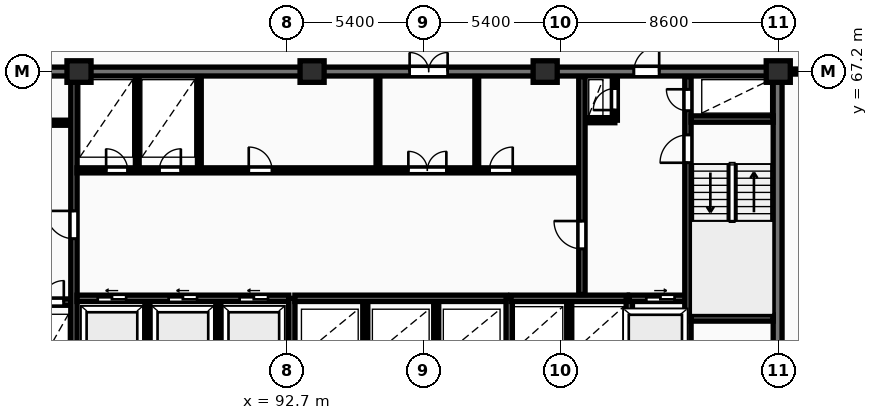
"""IFC4 building model, lengths in metres.
Left out: names, types, materials, properties, quantities, classifications, styles, units other than length and angle.
Written with IfcOpenShell. Run it as: python <this file> out.ifc"""

import sys

from ifc_helpers import new_model, si_unit, direction, frame, frame_2d, origin, origin_2d, place, context, subcontext, project, spatial, rectangle, extrude, element, fill, save


model = new_model("IFC4")
c1 = context("Model", 3, precision=1e-05, world=origin(), true_north=direction((0.0, 1.0)))
c2 = subcontext(c1, "Body", "Model", "MODEL_VIEW")
j1 = project(units=[si_unit("LENGTHUNIT", "METRE"), si_unit("PLANEANGLEUNIT", "RADIAN")], contexts=[c1])
p1 = place(None, origin())
s1 = spatial("IfcSite", under=j1, at=p1, CompositionType="ELEMENT")
p2 = place(p1, origin())
s2 = spatial("IfcBuilding", under=s1, at=p2, CompositionType="ELEMENT")
p3 = place(p2, frame((0.0, 0.0, 87.3)))
s3 = spatial("IfcBuildingStorey", under=s2, at=p3, CompositionType="ELEMENT", Elevation=87.3)
for number, where, z_axis, x_axis in (
    (1, (84.5, 67.2, 0.0), (0.0, 0.0, 1.0), (1.0, 0.0, 0.0)),
    (2, (93.7, 67.2, 0.0), (0.0, 0.0, 1.0), (1.0, 0.0, 0.0)),
    (3, (102.9, 67.2, 0.0), (0.0, 0.0, 1.0), (1.0, 0.0, 0.0)),
    (4, (112.1, 67.2, 0.0), (0.0, 0.0, 1.0), (1.0, 0.0, 0.0)),
):
    element("IfcColumn", number, at=place(p3, frame(where, z_axis=z_axis, x_axis=x_axis)), inside=s3, PredefinedType="COLUMN", context=c2, shape_type="SweptSolid", body=[
        extrude(rectangle(XDim=0.95, YDim=0.85, at=origin_2d()), origin(), (0.0, 0.0, 1.0), 3.25),
    ])
p4 = place(p3, frame((112.075, 55.375, 0.0), z_axis=(0.0, 0.0, 1.0), x_axis=(0.0, 1.0, 0.0)))
e5 = element("IfcWall", 5, at=p4, inside=s3, PredefinedType="SHEAR", context=c2, shape_type="SweptSolid", body=[
    extrude(rectangle(XDim=11.65, YDim=0.35, at=frame_2d((5.825, 0.0))), origin(), (0.0, 0.0, 1.0), 3.25),
])
p5 = place(p3, frame((75.95, 67.2, 0.0), z_axis=(0.0, 0.0, 1.0), x_axis=(1.0, 0.0, 0.0)))
e6 = element("IfcWall", 6, at=p5, inside=s3, PredefinedType="SHEAR", context=c2, shape_type="SweptSolid", body=[
    extrude(rectangle(XDim=36.3, YDim=0.35, at=frame_2d((18.15, 0.0))), origin(), (0.0, 0.0, 1.0), 3.25),
])
p6 = place(p5, frame((5.25, 0.0, 0.0)))
e7 = element("IfcOpeningElement", 7, at=p6, cuts=e6, PredefinedType="OPENING", context=c2, shape_type="SweptSolid", body=[
    extrude(rectangle(XDim=1.0, YDim=2.15, at=frame_2d((0.5, 1.075))), frame((0.0, 0.185, 0.0), z_axis=(0.0, -1.0, 0.0), x_axis=(1.0, 0.0, 0.0)), (0.0, 0.0, 1.0), 0.37),
])
p7 = place(p5, frame((21.6, 0.0, 0.0)))
e8 = element("IfcOpeningElement", 8, at=p7, cuts=e6, PredefinedType="OPENING", context=c2, shape_type="SweptSolid", body=[
    extrude(rectangle(XDim=1.5, YDim=2.2, at=frame_2d((0.75, 1.1))), frame((0.0, 0.185, 0.0), z_axis=(0.0, -1.0, 0.0), x_axis=(1.0, 0.0, 0.0)), (0.0, 0.0, 1.0), 0.37),
])
p8 = place(p5, frame((30.45, 0.0, 0.0)))
e9 = element("IfcOpeningElement", 9, at=p8, cuts=e6, PredefinedType="OPENING", context=c2, shape_type="SweptSolid", body=[
    extrude(rectangle(XDim=1.0, YDim=2.15, at=frame_2d((0.5, 1.075))), frame((0.0, 0.185, 0.0), z_axis=(0.0, -1.0, 0.0), x_axis=(1.0, 0.0, 0.0)), (0.0, 0.0, 1.0), 0.37),
])
p9 = place(p3, frame((79.79, 58.1, 0.0), z_axis=(0.0, 0.0, 1.0), x_axis=(1.0, 0.0, 0.0)))
e10 = element("IfcWall", 10, at=p9, inside=s3, PredefinedType="SHEAR", context=c2, shape_type="SweptSolid", body=[
    extrude(rectangle(XDim=4.39, YDim=0.25, at=frame_2d((2.195, 0.0))), origin(), (0.0, 0.0, 1.0), 3.25),
])
p10 = place(p9, frame((1.05, 0.0, 0.0)))
e11 = element("IfcOpeningElement", 11, at=p10, cuts=e10, PredefinedType="OPENING", context=c2, shape_type="SweptSolid", body=[
    extrude(rectangle(XDim=1.12, YDim=2.12, at=frame_2d((0.56, 1.06))), frame((0.0, 0.135, 0.0), z_axis=(0.0, -1.0, 0.0), x_axis=(1.0, 0.0, 0.0)), (0.0, 0.0, 1.0), 0.27),
])
p11 = place(p9, frame((3.26, 0.0, 0.0)))
e12 = element("IfcOpeningElement", 12, at=p11, cuts=e10, PredefinedType="OPENING", context=c2, shape_type="SweptSolid", body=[
    extrude(rectangle(XDim=0.85, YDim=2.05, at=frame_2d((0.425, 1.025))), frame((0.0, 0.135, 0.0), z_axis=(0.0, -1.0, 0.0), x_axis=(1.0, 0.0, 0.0)), (0.0, 0.0, 1.0), 0.27),
])
p12 = place(p3, frame((79.79, 65.18, 0.0), z_axis=(0.0, 0.0, 1.0), x_axis=(1.0, 0.0, 0.0)))
e13 = element("IfcWall", 13, at=p12, inside=s3, PredefinedType="PARTITIONING", context=c2, shape_type="SweptSolid", body=[
    extrude(rectangle(XDim=4.39, YDim=0.2, at=frame_2d((2.195, 0.0))), origin(), (0.0, 0.0, 1.0), 2.97),
])
p13 = place(p12, frame((1.5, 0.0, 0.0)))
e14 = element("IfcOpeningElement", 14, at=p13, cuts=e13, PredefinedType="OPENING", context=c2, shape_type="SweptSolid", body=[
    extrude(rectangle(XDim=1.1, YDim=2.1, at=frame_2d((0.55, 1.05))), frame((0.0, 0.11, 0.0), z_axis=(0.0, -1.0, 0.0), x_axis=(1.0, 0.0, 0.0)), (0.0, 0.0, 1.0), 0.22),
])
p14 = place(p3, frame((84.3, 55.4, 0.0), z_axis=(0.0, 0.0, 1.0), x_axis=(0.0, 1.0, 0.0)))
e15 = element("IfcWall", 15, at=p14, inside=s3, PredefinedType="SHEAR", context=c2, shape_type="SweptSolid", body=[
    extrude(rectangle(XDim=11.6, YDim=0.25, at=frame_2d((5.8, 0.0))), origin(), (0.0, 0.0, 1.0), 3.25),
])
p15 = place(p14, frame((5.2, 0.0, 0.0)))
e16 = element("IfcOpeningElement", 16, at=p15, cuts=e15, PredefinedType="OPENING", context=c2, shape_type="SweptSolid", body=[
    extrude(rectangle(XDim=1.1, YDim=2.1, at=frame_2d((0.55, 1.05))), frame((0.0, 0.135, 0.0), z_axis=(0.0, -1.0, 0.0), x_axis=(1.0, 0.0, 0.0)), (0.0, 0.0, 1.0), 0.27),
])
for number, where, z_axis, x_axis in (
    (17, (87.2, 55.4, 0.0), (0.0, 0.0, 1.0), (0.0, 1.0, 0.0)),
    (18, (90.0, 55.4, 0.0), (0.0, 0.0, 1.0), (0.0, 1.0, 0.0)),
):
    element("IfcWall", number, at=place(p3, frame(where, z_axis=z_axis, x_axis=x_axis)), inside=s3, PredefinedType="PARTITIONING", context=c2, shape_type="SweptSolid", body=[
        extrude(rectangle(XDim=2.72, YDim=0.2, at=frame_2d((1.36, 0.0))), origin(), (0.0, 0.0, 1.0), 2.97),
    ])
p16 = place(p3, frame((84.42, 58.25, 0.0), z_axis=(0.0, 0.0, 1.0), x_axis=(1.0, 0.0, 0.0)))
e19 = element("IfcWall", 19, at=p16, inside=s3, PredefinedType="SHEAR", context=c2, shape_type="SweptSolid", body=[
    extrude(rectangle(XDim=8.36, YDim=0.25, at=frame_2d((4.18, 0.0))), origin(), (0.0, 0.0, 1.0), 3.25),
])
p17 = place(p16, frame((0.82, 0.0, 0.0)))
e20 = element("IfcOpeningElement", 20, at=p17, cuts=e19, PredefinedType="OPENING", context=c2, shape_type="SweptSolid", body=[
    extrude(rectangle(XDim=1.12, YDim=2.12, at=frame_2d((0.56, 1.06))), frame((0.0, 0.135, 0.0), z_axis=(0.0, -1.0, 0.0), x_axis=(1.0, 0.0, 0.0)), (0.0, 0.0, 1.0), 0.27),
])
p18 = place(p16, frame((3.62, 0.0, 0.0)))
e21 = element("IfcOpeningElement", 21, at=p18, cuts=e19, PredefinedType="OPENING", context=c2, shape_type="SweptSolid", body=[
    extrude(rectangle(XDim=1.12, YDim=2.12, at=frame_2d((0.56, 1.06))), frame((0.0, 0.135, 0.0), z_axis=(0.0, -1.0, 0.0), x_axis=(1.0, 0.0, 0.0)), (0.0, 0.0, 1.0), 0.27),
])
p19 = place(p16, frame((6.42, 0.0, 0.0)))
e22 = element("IfcOpeningElement", 22, at=p19, cuts=e19, PredefinedType="OPENING", context=c2, shape_type="SweptSolid", body=[
    extrude(rectangle(XDim=1.12, YDim=2.12, at=frame_2d((0.56, 1.06))), frame((0.0, 0.135, 0.0), z_axis=(0.0, -1.0, 0.0), x_axis=(1.0, 0.0, 0.0)), (0.0, 0.0, 1.0), 0.27),
])
p20 = place(p3, frame((92.9, 55.4, 0.0), z_axis=(0.0, 0.0, 1.0), x_axis=(0.0, 1.0, 0.0)))
e23 = element("IfcWall", 23, at=p20, inside=s3, PredefinedType="SHEAR", context=c2, shape_type="SweptSolid", body=[
    extrude(rectangle(XDim=2.85, YDim=0.25, at=frame_2d((1.425, 0.0))), origin(), (0.0, 0.0, 1.0), 3.25),
])
for number, where, z_axis, x_axis in (
    (24, (95.8, 55.4, 0.0), (0.0, 0.0, 1.0), (0.0, 1.0, 0.0)),
    (25, (98.6, 55.4, 0.0), (0.0, 0.0, 1.0), (0.0, 1.0, 0.0)),
):
    element("IfcWall", number, at=place(p3, frame(where, z_axis=z_axis, x_axis=x_axis)), inside=s3, PredefinedType="PARTITIONING", context=c2, shape_type="SweptSolid", body=[
        extrude(rectangle(XDim=2.72, YDim=0.2, at=frame_2d((1.36, 0.0))), origin(), (0.0, 0.0, 1.0), 2.97),
    ])
p21 = place(p3, frame((93.02, 58.25, 0.0), z_axis=(0.0, 0.0, 1.0), x_axis=(1.0, 0.0, 0.0)))
e26 = element("IfcWall", 26, at=p21, inside=s3, PredefinedType="SHEAR", context=c2, shape_type="SweptSolid", body=[
    extrude(rectangle(XDim=8.36, YDim=0.25, at=frame_2d((4.18, 0.0))), origin(), (0.0, 0.0, 1.0), 3.25),
])
p22 = place(p3, frame((101.48, 55.4, 0.0), z_axis=(0.0, 0.0, 1.0), x_axis=(0.0, 1.0, 0.0)))
e27 = element("IfcWall", 27, at=p22, inside=s3, PredefinedType="SHEAR", context=c2, shape_type="SweptSolid", body=[
    extrude(rectangle(XDim=2.85, YDim=0.25, at=frame_2d((1.425, 0.0))), origin(), (0.0, 0.0, 1.0), 3.25),
])
p23 = place(p3, frame((103.85, 55.4, 0.0), z_axis=(0.0, 0.0, 1.0), x_axis=(0.0, 1.0, 0.0)))
e28 = element("IfcWall", 28, at=p23, inside=s3, PredefinedType="PARTITIONING", context=c2, shape_type="SweptSolid", body=[
    extrude(rectangle(XDim=2.72, YDim=0.2, at=frame_2d((1.36, 0.0))), origin(), (0.0, 0.0, 1.0), 2.97),
])
p24 = place(p3, frame((101.55, 58.25, 0.0), z_axis=(0.0, 0.0, 1.0), x_axis=(1.0, 0.0, 0.0)))
e29 = element("IfcWall", 29, at=p24, inside=s3, PredefinedType="SHEAR", context=c2, shape_type="SweptSolid", body=[
    extrude(rectangle(XDim=4.6, YDim=0.25, at=frame_2d((2.3, 0.0))), origin(), (0.0, 0.0, 1.0), 3.25),
])
p25 = place(p3, frame((106.22, 55.4, 0.0), z_axis=(0.0, 0.0, 1.0), x_axis=(0.0, 1.0, 0.0)))
e30 = element("IfcWall", 30, at=p25, inside=s3, PredefinedType="SHEAR", context=c2, shape_type="SweptSolid", body=[
    extrude(rectangle(XDim=2.85, YDim=0.25, at=frame_2d((1.425, 0.0))), origin(), (0.0, 0.0, 1.0), 3.25),
])
p26 = place(p3, frame((106.22, 58.25, 0.0), z_axis=(0.0, 0.0, 1.0), x_axis=(1.0, 0.0, 0.0)))
e31 = element("IfcWall", 31, at=p26, inside=s3, PredefinedType="SHEAR", context=c2, shape_type="SweptSolid", body=[
    extrude(rectangle(XDim=2.46, YDim=0.25, at=frame_2d((1.23, 0.0))), origin(), (0.0, 0.0, 1.0), 3.25),
])
p27 = place(p26, frame((0.67, 0.0, 0.0)))
e32 = element("IfcOpeningElement", 32, at=p27, cuts=e31, PredefinedType="OPENING", context=c2, shape_type="SweptSolid", body=[
    extrude(rectangle(XDim=1.12, YDim=2.12, at=frame_2d((0.56, 1.06))), frame((0.0, 0.135, 0.0), z_axis=(0.0, -1.0, 0.0), x_axis=(1.0, 0.0, 0.0)), (0.0, 0.0, 1.0), 0.27),
])
for number, where, z_axis, x_axis in (
    (33, (86.8, 63.4, 0.0), (0.0, 0.0, 1.0), (0.0, 1.0, 0.0)),
    (34, (89.25, 63.4, 0.0), (0.0, 0.0, 1.0), (0.0, 1.0, 0.0)),
    (35, (96.3, 63.4, 0.0), (0.0, 0.0, 1.0), (0.0, 1.0, 0.0)),
    (36, (100.2, 63.4, 0.0), (0.0, 0.0, 1.0), (0.0, 1.0, 0.0)),
):
    element("IfcWall", number, at=place(p3, frame(where, z_axis=z_axis, x_axis=x_axis)), inside=s3, PredefinedType="PARTITIONING", context=c2, shape_type="SweptSolid", body=[
        extrude(rectangle(XDim=3.6, YDim=0.15, at=frame_2d((1.8, 0.0))), origin(), (0.0, 0.0, 1.0), 2.97),
    ])
p28 = place(p3, frame((84.42, 63.3, 0.0), z_axis=(0.0, 0.0, 1.0), x_axis=(1.0, 0.0, 0.0)))
e37 = element("IfcWall", 37, at=p28, inside=s3, PredefinedType="PARTITIONING", context=c2, shape_type="SweptSolid", body=[
    extrude(rectangle(XDim=19.83, YDim=0.2, at=frame_2d((9.915, 0.0))), origin(), (0.0, 0.0, 1.0), 2.97),
])
p29 = place(p28, frame((1.15, 0.0, 0.0)))
e38 = element("IfcOpeningElement", 38, at=p29, cuts=e37, PredefinedType="OPENING", context=c2, shape_type="SweptSolid", body=[
    extrude(rectangle(XDim=0.85, YDim=2.05, at=frame_2d((0.425, 1.025))), frame((0.0, 0.11, 0.0), z_axis=(0.0, -1.0, 0.0), x_axis=(1.0, 0.0, 0.0)), (0.0, 0.0, 1.0), 0.22),
])
p30 = place(p28, frame((3.25, 0.0, 0.0)))
e39 = element("IfcOpeningElement", 39, at=p30, cuts=e37, PredefinedType="OPENING", context=c2, shape_type="SweptSolid", body=[
    extrude(rectangle(XDim=0.85, YDim=2.05, at=frame_2d((0.425, 1.025))), frame((0.0, 0.11, 0.0), z_axis=(0.0, -1.0, 0.0), x_axis=(1.0, 0.0, 0.0)), (0.0, 0.0, 1.0), 0.22),
])
p31 = place(p28, frame((13.08, 0.0, 0.0)))
e40 = element("IfcOpeningElement", 40, at=p31, cuts=e37, PredefinedType="OPENING", context=c2, shape_type="SweptSolid", body=[
    extrude(rectangle(XDim=1.5, YDim=2.2, at=frame_2d((0.75, 1.1))), frame((0.0, 0.11, 0.0), z_axis=(0.0, -1.0, 0.0), x_axis=(1.0, 0.0, 0.0)), (0.0, 0.0, 1.0), 0.22),
])
p32 = place(p28, frame((6.78, 0.0, 0.0)))
e41 = element("IfcOpeningElement", 41, at=p32, cuts=e37, PredefinedType="OPENING", context=c2, shape_type="SweptSolid", body=[
    extrude(rectangle(XDim=0.92, YDim=2.08, at=frame_2d((0.46, 1.04))), frame((0.0, 0.11, 0.0), z_axis=(0.0, -1.0, 0.0), x_axis=(1.0, 0.0, 0.0)), (0.0, 0.0, 1.0), 0.22),
])
p33 = place(p28, frame((16.28, 0.0, 0.0)))
e42 = element("IfcOpeningElement", 42, at=p33, cuts=e37, PredefinedType="OPENING", context=c2, shape_type="SweptSolid", body=[
    extrude(rectangle(XDim=0.92, YDim=2.08, at=frame_2d((0.46, 1.04))), frame((0.0, 0.11, 0.0), z_axis=(0.0, -1.0, 0.0), x_axis=(1.0, 0.0, 0.0)), (0.0, 0.0, 1.0), 0.22),
])
p34 = place(p3, frame((104.45, 65.28, 0.0), z_axis=(0.0, 0.0, 1.0), x_axis=(1.0, 0.0, 0.0)))
e43 = element("IfcWall", 43, at=p34, inside=s3, PredefinedType="PARTITIONING", context=c2, shape_type="SweptSolid", body=[
    extrude(rectangle(XDim=1.2, YDim=0.2, at=frame_2d((0.6, 0.0))), origin(), (0.0, 0.0, 1.0), 2.97),
])
p35 = place(p3, frame((105.65, 65.28, 0.0), z_axis=(0.0, 0.0, 1.0), x_axis=(0.0, 1.0, 0.0)))
e44 = element("IfcWall", 44, at=p35, inside=s3, PredefinedType="PARTITIONING", context=c2, shape_type="SweptSolid", body=[
    extrude(rectangle(XDim=1.72, YDim=0.2, at=frame_2d((0.86, 0.0))), origin(), (0.0, 0.0, 1.0), 2.97),
])
p36 = place(p35, frame((0.4, 0.0, 0.0)))
e45 = element("IfcOpeningElement", 45, at=p36, cuts=e44, PredefinedType="OPENING", context=c2, shape_type="SweptSolid", body=[
    extrude(rectangle(XDim=0.85, YDim=2.05, at=frame_2d((0.425, 1.025))), frame((0.0, 0.11, 0.0), z_axis=(0.0, -1.0, 0.0), x_axis=(1.0, 0.0, 0.0)), (0.0, 0.0, 1.0), 0.22),
])
p37 = place(p3, frame((104.35, 58.4, 0.0), z_axis=(0.0, 0.0, 1.0), x_axis=(0.0, 1.0, 0.0)))
e46 = element("IfcWall", 46, at=p37, inside=s3, PredefinedType="SHEAR", context=c2, shape_type="SweptSolid", body=[
    extrude(rectangle(XDim=8.6, YDim=0.25, at=frame_2d((4.3, 0.0))), origin(), (0.0, 0.0, 1.0), 3.25),
])
p38 = place(p37, frame((1.8, 0.0, 0.0)))
e47 = element("IfcOpeningElement", 47, at=p38, cuts=e46, PredefinedType="OPENING", context=c2, shape_type="SweptSolid", body=[
    extrude(rectangle(XDim=1.1, YDim=2.1, at=frame_2d((0.55, 1.05))), frame((0.0, 0.135, 0.0), z_axis=(0.0, -1.0, 0.0), x_axis=(1.0, 0.0, 0.0)), (0.0, 0.0, 1.0), 0.27),
])
p39 = place(p3, frame((108.535, 55.4, 0.0), z_axis=(0.0, 0.0, 1.0), x_axis=(0.0, 1.0, 0.0)))
e48 = element("IfcWall", 48, at=p39, inside=s3, PredefinedType="SHEAR", context=c2, shape_type="SweptSolid", body=[
    extrude(rectangle(XDim=11.6, YDim=0.25, at=frame_2d((5.8, 0.0))), origin(), (0.0, 0.0, 1.0), 3.25),
])
p40 = place(p39, frame((8.2, 0.0, 0.0)))
e49 = element("IfcOpeningElement", 49, at=p40, cuts=e48, PredefinedType="OPENING", context=c2, shape_type="SweptSolid", body=[
    extrude(rectangle(XDim=1.1, YDim=2.1, at=frame_2d((0.55, 1.05))), frame((0.0, 0.135, 0.0), z_axis=(0.0, -1.0, 0.0), x_axis=(1.0, 0.0, 0.0)), (0.0, 0.0, 1.0), 0.27),
])
p41 = place(p39, frame((10.25, 0.0, 0.0)))
e50 = element("IfcOpeningElement", 50, at=p41, cuts=e48, PredefinedType="OPENING", context=c2, shape_type="SweptSolid", body=[
    extrude(rectangle(XDim=0.85, YDim=2.05, at=frame_2d((0.425, 1.025))), frame((0.0, 0.135, 0.0), z_axis=(0.0, -1.0, 0.0), x_axis=(1.0, 0.0, 0.0)), (0.0, 0.0, 1.0), 0.27),
])
for number, where, z_axis, x_axis in (
    (51, (108.66, 57.475, 0.0), (0.0, 0.0, 1.0), (1.0, 0.0, 0.0)),
    (52, (108.66, 65.325, 0.0), (0.0, 0.0, 1.0), (1.0, 0.0, 0.0)),
):
    element("IfcWall", number, at=place(p3, frame(where, z_axis=z_axis, x_axis=x_axis)), inside=s3, PredefinedType="SHEAR", context=c2, shape_type="SweptSolid", body=[
        extrude(rectangle(XDim=3.24, YDim=0.25, at=frame_2d((1.62, 0.0))), origin(), (0.0, 0.0, 1.0), 3.25),
    ])
p42 = place(p3, frame((112.25, 67.2, 0.0), z_axis=(0.0, 0.0, 1.0), x_axis=(1.0, 0.0, 0.0)))
e53 = element("IfcWall", 53, at=p42, inside=s3, PredefinedType="PARTITIONING", context=c2, shape_type="SweptSolid", body=[
    extrude(rectangle(XDim=18.35, YDim=0.2, at=frame_2d((9.175, 0.0))), origin(), (0.0, 0.0, 1.0), 2.433),
])
p43 = place(p42, frame((1.58, 0.0, 0.0)))
e54 = element("IfcOpeningElement", 54, at=p43, cuts=e53, PredefinedType="OPENING", context=c2, shape_type="SweptSolid", body=[
    extrude(rectangle(XDim=0.95, YDim=2.15, at=frame_2d((0.475, 1.075))), frame((0.0, 0.11, 0.0), z_axis=(0.0, -1.0, 0.0), x_axis=(1.0, 0.0, 0.0)), (0.0, 0.0, 1.0), 0.22),
])
p44 = place(p7, origin())
e55 = element("IfcDoor", 55, at=p44, inside=s3, OperationType="DOUBLE_DOOR_SINGLE_SWING", PredefinedType="DOOR", context=c2, shape_type="SweptSolid", body=[
    extrude(rectangle(XDim=1.5, YDim=2.2, at=frame_2d((0.75, 1.1))), frame((0.0, 0.025, 0.0), z_axis=(0.0, -1.0, 0.0), x_axis=(1.0, 0.0, 0.0)), (0.0, 0.0, 1.0), 0.05),
])
fill(e8, e55)
p45 = place(p8, origin())
e56 = element("IfcDoor", 56, at=p45, inside=s3, OperationType="SINGLE_SWING_RIGHT", PredefinedType="DOOR", context=c2, shape_type="SweptSolid", body=[
    extrude(rectangle(XDim=1.0, YDim=2.15, at=frame_2d((0.5, 1.075))), frame((0.0, 0.025, 0.0), z_axis=(0.0, -1.0, 0.0), x_axis=(1.0, 0.0, 0.0)), (0.0, 0.0, 1.0), 0.05),
])
fill(e9, e56)
p46 = place(p11, origin())
e57 = element("IfcDoor", 57, at=p46, inside=s3, OperationType="SINGLE_SWING_RIGHT", PredefinedType="DOOR", context=c2, shape_type="SweptSolid", body=[
    extrude(rectangle(XDim=0.85, YDim=2.05, at=frame_2d((0.425, 1.025))), frame((0.0, 0.025, 0.0), z_axis=(0.0, -1.0, 0.0), x_axis=(1.0, 0.0, 0.0)), (0.0, 0.0, 1.0), 0.05),
])
fill(e12, e57)
p47 = place(p15, origin())
e58 = element("IfcDoor", 58, at=p47, inside=s3, OperationType="SINGLE_SWING_RIGHT", PredefinedType="DOOR", context=c2, shape_type="SweptSolid", body=[
    extrude(rectangle(XDim=1.1, YDim=2.1, at=frame_2d((0.55, 1.05))), frame((0.0, 0.025, 0.0), z_axis=(0.0, -1.0, 0.0), x_axis=(1.0, 0.0, 0.0)), (0.0, 0.0, 1.0), 0.05),
])
fill(e16, e58)
p48 = place(p17, origin())
e59 = element("IfcDoor", 59, at=p48, inside=s3, OperationType="SLIDING_TO_LEFT", PredefinedType="DOOR", context=c2, shape_type="SweptSolid", body=[
    extrude(rectangle(XDim=1.12, YDim=2.12, at=frame_2d((0.56, 1.06))), frame((0.0, 0.025, 0.0), z_axis=(0.0, -1.0, 0.0), x_axis=(1.0, 0.0, 0.0)), (0.0, 0.0, 1.0), 0.05),
])
fill(e20, e59)
p49 = place(p18, origin())
e60 = element("IfcDoor", 60, at=p49, inside=s3, OperationType="SLIDING_TO_LEFT", PredefinedType="DOOR", context=c2, shape_type="SweptSolid", body=[
    extrude(rectangle(XDim=1.12, YDim=2.12, at=frame_2d((0.56, 1.06))), frame((0.0, 0.025, 0.0), z_axis=(0.0, -1.0, 0.0), x_axis=(1.0, 0.0, 0.0)), (0.0, 0.0, 1.0), 0.05),
])
fill(e21, e60)
p50 = place(p19, origin())
e61 = element("IfcDoor", 61, at=p50, inside=s3, OperationType="SLIDING_TO_LEFT", PredefinedType="DOOR", context=c2, shape_type="SweptSolid", body=[
    extrude(rectangle(XDim=1.12, YDim=2.12, at=frame_2d((0.56, 1.06))), frame((0.0, 0.025, 0.0), z_axis=(0.0, -1.0, 0.0), x_axis=(1.0, 0.0, 0.0)), (0.0, 0.0, 1.0), 0.05),
])
fill(e22, e61)
p51 = place(p27, origin())
e62 = element("IfcDoor", 62, at=p51, inside=s3, OperationType="SLIDING_TO_RIGHT", PredefinedType="DOOR", context=c2, shape_type="SweptSolid", body=[
    extrude(rectangle(XDim=1.12, YDim=2.12, at=frame_2d((0.56, 1.06))), frame((0.0, 0.025, 0.0), z_axis=(0.0, -1.0, 0.0), x_axis=(1.0, 0.0, 0.0)), (0.0, 0.0, 1.0), 0.05),
])
fill(e32, e62)
p52 = place(p29, origin())
e63 = element("IfcDoor", 63, at=p52, inside=s3, OperationType="SINGLE_SWING_LEFT", PredefinedType="DOOR", context=c2, shape_type="SweptSolid", body=[
    extrude(rectangle(XDim=0.85, YDim=2.05, at=frame_2d((0.425, 1.025))), frame((0.0, 0.025, 0.0), z_axis=(0.0, -1.0, 0.0), x_axis=(1.0, 0.0, 0.0)), (0.0, 0.0, 1.0), 0.05),
])
fill(e38, e63)
p53 = place(p30, origin())
e64 = element("IfcDoor", 64, at=p53, inside=s3, OperationType="SINGLE_SWING_RIGHT", PredefinedType="DOOR", context=c2, shape_type="SweptSolid", body=[
    extrude(rectangle(XDim=0.85, YDim=2.05, at=frame_2d((0.425, 1.025))), frame((0.0, 0.025, 0.0), z_axis=(0.0, -1.0, 0.0), x_axis=(1.0, 0.0, 0.0)), (0.0, 0.0, 1.0), 0.05),
])
fill(e39, e64)
p54 = place(p31, origin())
e65 = element("IfcDoor", 65, at=p54, inside=s3, OperationType="DOUBLE_DOOR_SINGLE_SWING", PredefinedType="DOOR", context=c2, shape_type="SweptSolid", body=[
    extrude(rectangle(XDim=1.5, YDim=2.2, at=frame_2d((0.75, 1.1))), frame((0.0, 0.025, 0.0), z_axis=(0.0, -1.0, 0.0), x_axis=(1.0, 0.0, 0.0)), (0.0, 0.0, 1.0), 0.05),
])
fill(e40, e65)
p55 = place(p32, origin())
e66 = element("IfcDoor", 66, at=p55, inside=s3, OperationType="SINGLE_SWING_LEFT", PredefinedType="DOOR", context=c2, shape_type="SweptSolid", body=[
    extrude(rectangle(XDim=0.92, YDim=2.08, at=frame_2d((0.46, 1.04))), frame((0.0, 0.025, 0.0), z_axis=(0.0, -1.0, 0.0), x_axis=(1.0, 0.0, 0.0)), (0.0, 0.0, 1.0), 0.05),
])
fill(e41, e66)
p56 = place(p33, origin())
e67 = element("IfcDoor", 67, at=p56, inside=s3, OperationType="SINGLE_SWING_RIGHT", PredefinedType="DOOR", context=c2, shape_type="SweptSolid", body=[
    extrude(rectangle(XDim=0.92, YDim=2.08, at=frame_2d((0.46, 1.04))), frame((0.0, 0.025, 0.0), z_axis=(0.0, -1.0, 0.0), x_axis=(1.0, 0.0, 0.0)), (0.0, 0.0, 1.0), 0.05),
])
fill(e42, e67)
p57 = place(p36, origin())
e68 = element("IfcDoor", 68, at=p57, inside=s3, OperationType="SINGLE_SWING_LEFT", PredefinedType="DOOR", context=c2, shape_type="SweptSolid", body=[
    extrude(rectangle(XDim=0.85, YDim=2.05, at=frame_2d((0.425, 1.025))), frame((0.0, 0.025, 0.0), z_axis=(0.0, -1.0, 0.0), x_axis=(1.0, 0.0, 0.0)), (0.0, 0.0, 1.0), 0.05),
])
fill(e45, e68)
p58 = place(p38, origin())
e69 = element("IfcDoor", 69, at=p58, inside=s3, OperationType="SINGLE_SWING_RIGHT", PredefinedType="DOOR", context=c2, shape_type="SweptSolid", body=[
    extrude(rectangle(XDim=1.1, YDim=2.1, at=frame_2d((0.55, 1.05))), frame((0.0, 0.025, 0.0), z_axis=(0.0, -1.0, 0.0), x_axis=(1.0, 0.0, 0.0)), (0.0, 0.0, 1.0), 0.05),
])
fill(e47, e69)
p59 = place(p40, origin())
e70 = element("IfcDoor", 70, at=p59, inside=s3, OperationType="SINGLE_SWING_LEFT", PredefinedType="DOOR", context=c2, shape_type="SweptSolid", body=[
    extrude(rectangle(XDim=1.1, YDim=2.1, at=frame_2d((0.55, 1.05))), frame((0.0, 0.025, 0.0), z_axis=(0.0, -1.0, 0.0), x_axis=(1.0, 0.0, 0.0)), (0.0, 0.0, 1.0), 0.05),
])
fill(e49, e70)
p60 = place(p41, origin())
e71 = element("IfcDoor", 71, at=p60, inside=s3, OperationType="SINGLE_SWING_RIGHT", PredefinedType="DOOR", context=c2, shape_type="SweptSolid", body=[
    extrude(rectangle(XDim=0.85, YDim=2.05, at=frame_2d((0.425, 1.025))), frame((0.0, 0.025, 0.0), z_axis=(0.0, -1.0, 0.0), x_axis=(1.0, 0.0, 0.0)), (0.0, 0.0, 1.0), 0.05),
])
fill(e50, e71)
save(model, sys.argv[1])
